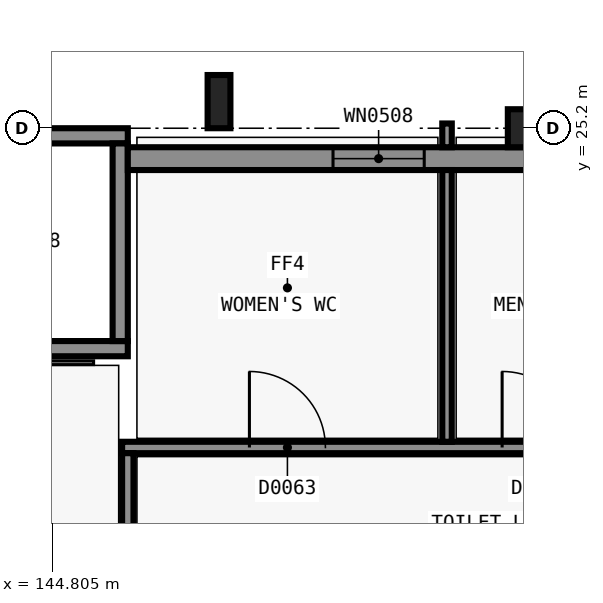
"""IFC4 building model, lengths in metres.
Left out: names, types, materials, properties, quantities, classifications, styles, units other than length and angle.
Written with IfcOpenShell. Run it as: python <this file> out.ifc"""

import sys

from ifc_helpers import new_model, si_unit, direction, frame, frame_2d, origin, origin_2d, place, context, subcontext, project, spatial, rectangle, extrude, element, fill, save


model = new_model("IFC4")
c1 = context("Model", 3, precision=1e-05, world=origin(), true_north=direction((0.0, 1.0)))
c2 = subcontext(c1, "Body", "Model", "MODEL_VIEW")
j1 = project(units=[si_unit("LENGTHUNIT", "METRE"), si_unit("PLANEANGLEUNIT", "RADIAN")], contexts=[c1])
p1 = place(None, origin())
s1 = spatial("IfcSite", under=j1, at=p1, CompositionType="ELEMENT")
p2 = place(p1, origin())
s2 = spatial("IfcBuilding", under=s1, at=p2, CompositionType="ELEMENT")
p3 = place(p2, origin())
s3 = spatial("IfcBuildingStorey", under=s2, at=p3, CompositionType="ELEMENT", Elevation=0.0)
p4 = place(p3, frame((145.8, 22.3, -1.6), z_axis=(0.0, 0.0, 1.0), x_axis=(-1.0, 0.0, 0.0)))
e1 = element("IfcWall", 1, at=p4, inside=s3, PredefinedType="SHEAR", context=c2, shape_type="SweptSolid", body=[
    extrude(rectangle(XDim=4.2, YDim=0.2, at=frame_2d((2.1, 0.0))), origin(), (0.0, 0.0, 1.0), 7.0),
])
p5 = place(p4, frame((1.55, 0.0, 1.6)))
e2 = element("IfcOpeningElement", 2, at=p5, cuts=e1, PredefinedType="OPENING", context=c2, shape_type="SweptSolid", body=[
    extrude(rectangle(XDim=1.1, YDim=2.1, at=frame_2d((0.55, 1.05))), frame((0.0, 0.11, 0.0), z_axis=(0.0, -1.0, 0.0), x_axis=(1.0, 0.0, 0.0)), (0.0, 0.0, 1.0), 0.22),
])
p6 = place(p3, frame((141.6, 25.1, -1.6), z_axis=(0.0, 0.0, 1.0), x_axis=(1.0, 0.0, 0.0)))
e3 = element("IfcWall", 3, at=p6, inside=s3, PredefinedType="SHEAR", context=c2, shape_type="SweptSolid", body=[
    extrude(rectangle(XDim=4.2, YDim=0.2, at=frame_2d((2.1, 0.0))), origin(), (0.0, 0.0, 1.0), 7.0),
])
p7 = place(p3, frame((145.7, 25.0, -1.6), z_axis=(0.0, 0.0, 1.0), x_axis=(0.0, -1.0, 0.0)))
e4 = element("IfcWall", 4, at=p7, inside=s3, PredefinedType="SHEAR", context=c2, shape_type="SweptSolid", body=[
    extrude(rectangle(XDim=2.6, YDim=0.2, at=frame_2d((1.3, 0.0))), origin(), (0.0, 0.0, 1.0), 7.0),
])
p8 = place(p3, frame((151.2, 25.2, -0.3), z_axis=(0.0, 0.0, 1.0), x_axis=(1.0, 0.0, 0.0)))
e5 = element("IfcColumn", 5, at=p8, inside=s3, PredefinedType="COLUMN", context=c2, shape_type="SweptSolid", body=[
    extrude(rectangle(XDim=0.8, YDim=0.5, at=origin_2d()), origin(), (0.0, 0.0, 1.0), 5.7),
])
p9 = place(p3, frame((145.8, 24.8, 0.0), z_axis=(0.0, 0.0, 1.0), x_axis=(1.0, 0.0, 0.0)))
e6 = element("IfcWall", 6, at=p9, inside=s3, PredefinedType="SOLIDWALL", context=c2, shape_type="SweptSolid", body=[
    extrude(rectangle(XDim=18.0, YDim=0.3, at=frame_2d((9.0, 0.0))), origin(), (0.0, 0.0, 1.0), 5.1),
])
p10 = place(p9, frame((10.2, 0.0, 0.0)))
e7 = element("IfcOpeningElement", 7, at=p10, cuts=e6, PredefinedType="OPENING", context=c2, shape_type="SweptSolid", body=[
    extrude(rectangle(XDim=2.4, YDim=2.4, at=frame_2d((1.2, 1.2))), frame((0.0, 0.16, 0.0), z_axis=(0.0, -1.0, 0.0), x_axis=(1.0, 0.0, 0.0)), (0.0, 0.0, 1.0), 0.32),
])
p11 = place(p9, frame((15.0, 0.0, 0.0)))
e8 = element("IfcOpeningElement", 8, at=p11, cuts=e6, PredefinedType="OPENING", context=c2, shape_type="SweptSolid", body=[
    extrude(rectangle(XDim=1.8, YDim=2.2, at=frame_2d((0.9, 1.1))), frame((0.0, 0.16, 0.0), z_axis=(0.0, -1.0, 0.0), x_axis=(1.0, 0.0, 0.0)), (0.0, 0.0, 1.0), 0.32),
])
p12 = place(p9, frame((2.7, 0.0, 1.5)))
e9 = element("IfcOpeningElement", 9, at=p12, cuts=e6, PredefinedType="OPENING", context=c2, shape_type="SweptSolid", body=[
    extrude(rectangle(XDim=1.2, YDim=0.9, at=frame_2d((0.6, 0.45))), frame((0.0, 0.16, 0.0), z_axis=(0.0, -1.0, 0.0), x_axis=(1.0, 0.0, 0.0)), (0.0, 0.0, 1.0), 0.32),
])
p13 = place(p9, frame((6.9, 0.0, 1.5)))
e10 = element("IfcOpeningElement", 10, at=p13, cuts=e6, PredefinedType="OPENING", context=c2, shape_type="SweptSolid", body=[
    extrude(rectangle(XDim=1.2, YDim=0.9, at=frame_2d((0.6, 0.45))), frame((0.0, 0.16, 0.0), z_axis=(0.0, -1.0, 0.0), x_axis=(1.0, 0.0, 0.0)), (0.0, 0.0, 1.0), 0.32),
])
p14 = place(p3, frame((147.0, 25.55, -0.3), z_axis=(0.0, 0.0, 1.0), x_axis=(1.0, 0.0, 0.0)))
e11 = element("IfcColumn", 11, at=p14, inside=s3, PredefinedType="PILASTER", context=c2, shape_type="SweptSolid", body=[
    extrude(rectangle(XDim=0.3, YDim=0.7, at=origin_2d()), origin(), (0.0, 0.0, 1.0), 5.7),
])
p15 = place(p3, frame((145.725, 21.0, 0.0), z_axis=(0.0, 0.0, 1.0), x_axis=(1.0, 0.0, 0.0)))
e12 = element("IfcWall", 12, at=p15, inside=s3, PredefinedType="PARTITIONING", context=c2, shape_type="SweptSolid", body=[
    extrude(rectangle(XDim=9.75, YDim=0.15, at=frame_2d((4.875, 0.0))), origin(), (0.0, 0.0, 1.0), 4.4),
])
p16 = place(p15, frame((1.675, 0.0, 0.0)))
e13 = element("IfcOpeningElement", 13, at=p16, cuts=e12, PredefinedType="OPENING", context=c2, shape_type="SweptSolid", body=[
    extrude(rectangle(XDim=1.0, YDim=2.1, at=frame_2d((0.5, 1.05))), frame((0.0, 0.085, 0.0), z_axis=(0.0, -1.0, 0.0), x_axis=(1.0, 0.0, 0.0)), (0.0, 0.0, 1.0), 0.17),
])
p17 = place(p15, frame((5.0, 0.0, 0.0)))
e14 = element("IfcOpeningElement", 14, at=p17, cuts=e12, PredefinedType="OPENING", context=c2, shape_type="SweptSolid", body=[
    extrude(rectangle(XDim=1.0, YDim=2.1, at=frame_2d((0.5, 1.05))), frame((0.0, 0.085, 0.0), z_axis=(0.0, -1.0, 0.0), x_axis=(1.0, 0.0, 0.0)), (0.0, 0.0, 1.0), 0.17),
])
p18 = place(p3, frame((145.8, 16.925, 0.0), z_axis=(0.0, 0.0, 1.0), x_axis=(0.0, 1.0, 0.0)))
e15 = element("IfcWall", 15, at=p18, inside=s3, PredefinedType="SOLIDWALL", context=c2, shape_type="SweptSolid", body=[
    extrude(rectangle(XDim=4.0, YDim=0.15, at=frame_2d((2.0, 0.0))), origin(), (0.0, 0.0, 1.0), 4.4),
])
p19 = place(p3, frame((150.0, 21.075, 0.0), z_axis=(0.0, 0.0, 1.0), x_axis=(0.0, 1.0, 0.0)))
e16 = element("IfcWall", 16, at=p19, inside=s3, PredefinedType="PARTITIONING", context=c2, shape_type="SweptSolid", body=[
    extrude(rectangle(XDim=3.575, YDim=0.125, at=frame_2d((1.788, 0.0))), origin(), (0.0, 0.0, 1.0), 5.1),
])
p20 = place(p3, frame((150.0, 24.95, 0.0), z_axis=(0.0, 0.0, 1.0), x_axis=(0.0, 1.0, 0.0)))
e17 = element("IfcWall", 17, at=p20, inside=s3, PredefinedType="PARTITIONING", context=c2, shape_type="SweptSolid", body=[
    extrude(rectangle(XDim=0.312, YDim=0.125, at=frame_2d((0.156, 0.0))), origin(), (0.0, 0.0, 1.0), 4.6),
])
p21 = place(p12, origin())
e18 = element("IfcWindow", 18, at=p21, inside=s3, PartitioningType="SINGLE_PANEL", PredefinedType="WINDOW", context=c2, shape_type="SweptSolid", body=[
    extrude(rectangle(XDim=1.2, YDim=0.9, at=frame_2d((0.6, 0.45))), frame((0.0, 0.03, 0.0), z_axis=(0.0, -1.0, 0.0), x_axis=(1.0, 0.0, 0.0)), (0.0, 0.0, 1.0), 0.06),
])
fill(e9, e18)
p22 = place(p16, origin())
e19 = element("IfcDoor", 19, at=p22, inside=s3, OperationType="SINGLE_SWING_RIGHT", PredefinedType="DOOR", context=c2, shape_type="SweptSolid", body=[
    extrude(rectangle(XDim=1.0, YDim=2.1, at=frame_2d((0.5, 1.05))), frame((0.0, 0.025, 0.0), z_axis=(0.0, -1.0, 0.0), x_axis=(1.0, 0.0, 0.0)), (0.0, 0.0, 1.0), 0.05),
])
fill(e13, e19)
p23 = place(p17, origin())
e20 = element("IfcDoor", 20, at=p23, inside=s3, OperationType="SINGLE_SWING_RIGHT", PredefinedType="DOOR", context=c2, shape_type="SweptSolid", body=[
    extrude(rectangle(XDim=1.0, YDim=2.1, at=frame_2d((0.5, 1.05))), frame((0.0, 0.025, 0.0), z_axis=(0.0, -1.0, 0.0), x_axis=(1.0, 0.0, 0.0)), (0.0, 0.0, 1.0), 0.05),
])
fill(e14, e20)
save(model, sys.argv[1])
